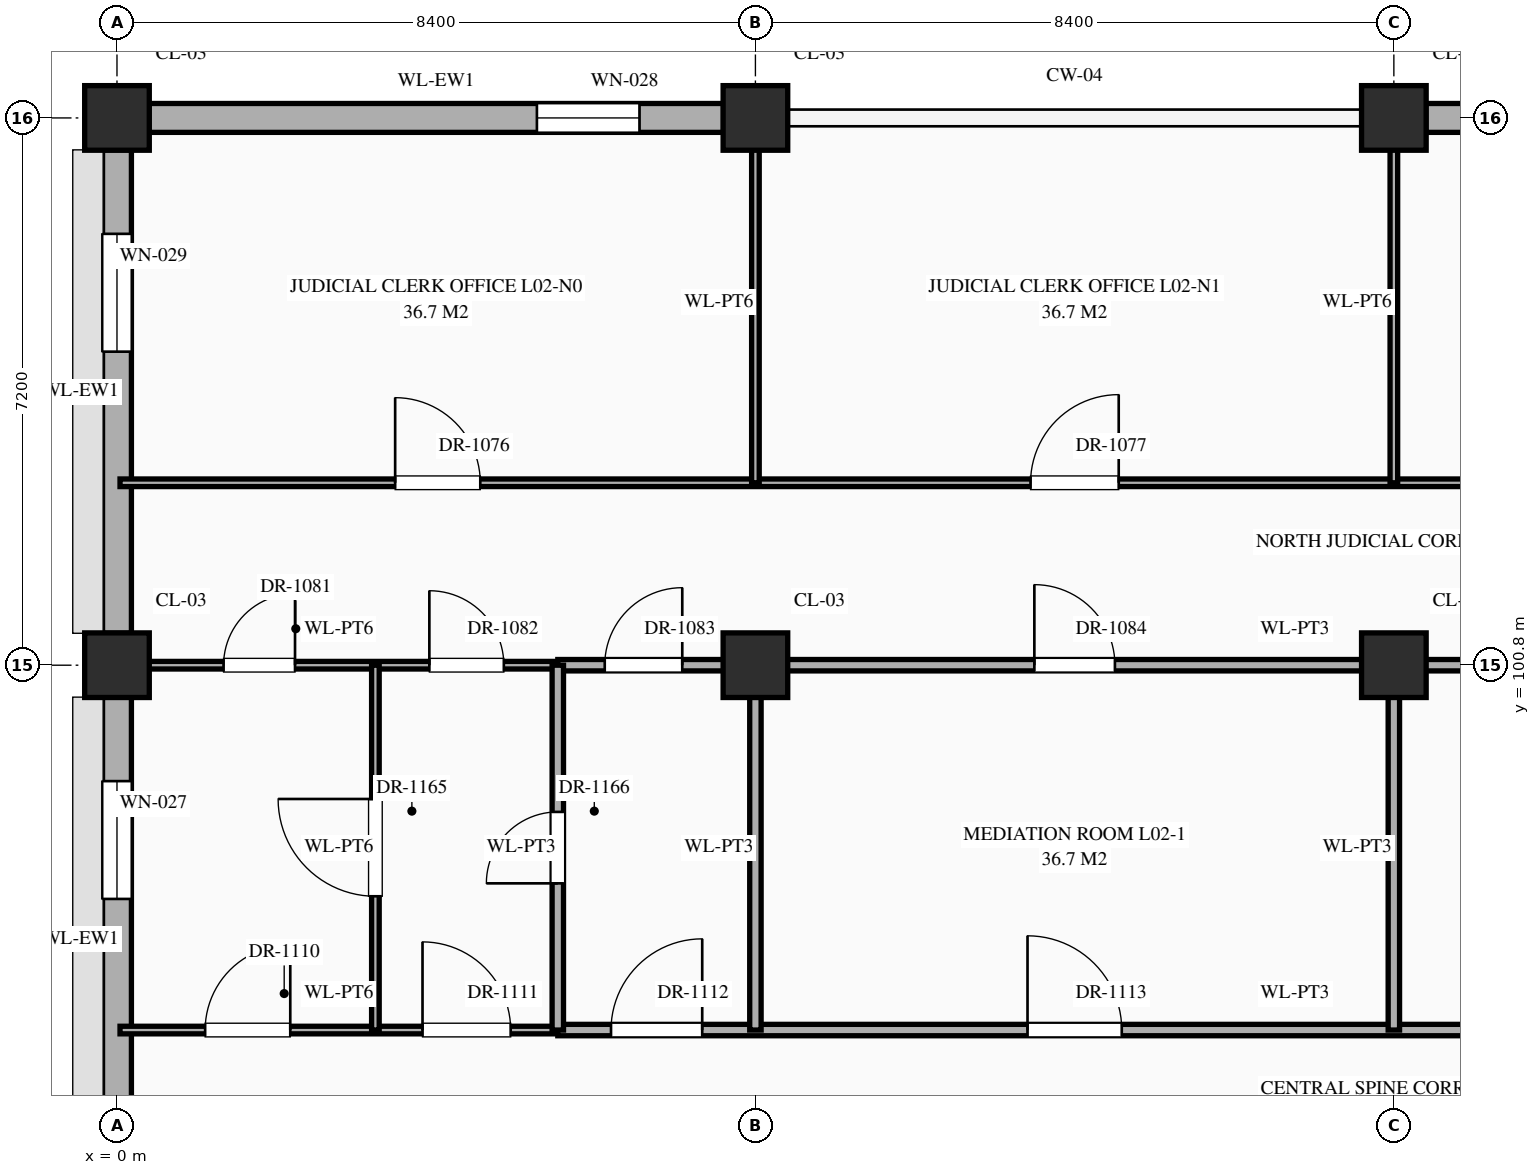
"""IFC4 building model, lengths in metres.
Left out: names, types, materials, properties, quantities, classifications, styles, units other than length and angle.
Written with IfcOpenShell. Run it as: python <this file> out.ifc"""

import sys

from ifc_helpers import new_model, si_unit, direction, frame, frame_2d, origin, origin_2d, place, context, subcontext, project, spatial, rectangle, extrude, element, fill, save


model = new_model("IFC4")
c1 = context("Model", 3, precision=1e-05, world=origin(), true_north=direction((0.0, 1.0)))
c2 = subcontext(c1, "Body", "Model", "MODEL_VIEW")
j1 = project(units=[si_unit("LENGTHUNIT", "METRE"), si_unit("PLANEANGLEUNIT", "RADIAN")], contexts=[c1])
p1 = place(None, origin())
s1 = spatial("IfcSite", under=j1, at=p1, CompositionType="ELEMENT")
p2 = place(p1, origin())
s2 = spatial("IfcBuilding", under=s1, at=p2, CompositionType="ELEMENT")
p3 = place(p2, frame((0.0, 0.0, 5.4)))
s3 = spatial("IfcBuildingStorey", under=s2, at=p3, CompositionType="ELEMENT", Elevation=5.4)
for number, where, z_axis, x_axis in (
    (1, (0.0, 100.8, 0.0), (0.0, 0.0, 1.0), (1.0, 0.0, 0.0)),
    (2, (0.0, 108.0, 0.0), (0.0, 0.0, 1.0), (1.0, 0.0, 0.0)),
    (3, (8.4, 100.8, 0.0), (0.0, 0.0, 1.0), (1.0, 0.0, 0.0)),
    (4, (8.4, 108.0, 0.0), (0.0, 0.0, 1.0), (1.0, 0.0, 0.0)),
    (5, (16.8, 100.8, 0.0), (0.0, 0.0, 1.0), (1.0, 0.0, 0.0)),
    (6, (16.8, 108.0, 0.0), (0.0, 0.0, 1.0), (1.0, 0.0, 0.0)),
):
    element("IfcColumn", number, at=place(p3, frame(where, z_axis=z_axis, x_axis=x_axis)), inside=s3, PredefinedType="COLUMN", context=c2, shape_type="SweptSolid", body=[
        extrude(rectangle(XDim=0.85, YDim=0.85, at=origin_2d()), origin(), (0.0, 0.0, 1.0), 5.4),
    ])
p4 = place(p3, frame((0.0, 94.02, 0.0), z_axis=(0.0, 0.0, 1.0), x_axis=(0.0, 1.0, 0.0)))
e7 = element("IfcWall", 7, at=p4, inside=s3, PredefinedType="STANDARD", context=c2, shape_type="SweptSolid", body=[
    extrude(rectangle(XDim=6.36, YDim=0.38, at=frame_2d((3.18, 0.0))), origin(), (0.0, 0.0, 1.0), 4.47),
])
p5 = place(p4, frame((3.705, 0.0, 0.85)))
e8 = element("IfcOpeningElement", 8, at=p5, cuts=e7, PredefinedType="OPENING", context=c2, shape_type="SweptSolid", body=[
    extrude(rectangle(XDim=1.55, YDim=1.74, at=frame_2d((0.775, 0.87))), frame((0.0, 0.202, 0.0), z_axis=(0.0, -1.0, 0.0), x_axis=(1.0, 0.0, 0.0)), (0.0, 0.0, 1.0), 0.404),
])
p6 = place(p3, frame((0.42, 108.0, 0.0), z_axis=(0.0, 0.0, 1.0), x_axis=(1.0, 0.0, 0.0)))
e9 = element("IfcWall", 9, at=p6, inside=s3, PredefinedType="STANDARD", context=c2, shape_type="SweptSolid", body=[
    extrude(rectangle(XDim=7.56, YDim=0.38, at=frame_2d((3.78, 0.0))), origin(), (0.0, 0.0, 1.0), 4.47),
])
p7 = place(p6, frame((5.105, 0.0, 0.85)))
e10 = element("IfcOpeningElement", 10, at=p7, cuts=e9, PredefinedType="OPENING", context=c2, shape_type="SweptSolid", body=[
    extrude(rectangle(XDim=1.35, YDim=1.92, at=frame_2d((0.675, 0.96))), frame((0.0, 0.202, 0.0), z_axis=(0.0, -1.0, 0.0), x_axis=(1.0, 0.0, 0.0)), (0.0, 0.0, 1.0), 0.404),
])
p8 = place(p3, frame((0.0, 101.22, 0.0), z_axis=(0.0, 0.0, 1.0), x_axis=(0.0, 1.0, 0.0)))
e11 = element("IfcWall", 11, at=p8, inside=s3, PredefinedType="STANDARD", context=c2, shape_type="SweptSolid", body=[
    extrude(rectangle(XDim=6.36, YDim=0.38, at=frame_2d((3.18, 0.0))), origin(), (0.0, 0.0, 1.0), 4.47),
])
p9 = place(p8, frame((3.705, 0.0, 0.85)))
e12 = element("IfcOpeningElement", 12, at=p9, cuts=e11, PredefinedType="OPENING", context=c2, shape_type="SweptSolid", body=[
    extrude(rectangle(XDim=1.55, YDim=1.92, at=frame_2d((0.775, 0.96))), frame((0.0, 0.202, 0.0), z_axis=(0.0, -1.0, 0.0), x_axis=(1.0, 0.0, 0.0)), (0.0, 0.0, 1.0), 0.404),
])
p10 = place(p3, frame((17.22, 108.0, 0.0), z_axis=(0.0, 0.0, 1.0), x_axis=(1.0, 0.0, 0.0)))
e13 = element("IfcWall", 13, at=p10, inside=s3, PredefinedType="STANDARD", context=c2, shape_type="SweptSolid", body=[
    extrude(rectangle(XDim=7.56, YDim=0.38, at=frame_2d((3.78, 0.0))), origin(), (0.0, 0.0, 1.0), 4.47),
])
p11 = place(p10, frame((5.33, 0.0, 0.85)))
e14 = element("IfcOpeningElement", 14, at=p11, cuts=e13, PredefinedType="OPENING", context=c2, shape_type="SweptSolid", body=[
    extrude(rectangle(XDim=0.9, YDim=1.2, at=frame_2d((0.45, 0.6))), frame((0.0, 0.202, 0.0), z_axis=(0.0, -1.0, 0.0), x_axis=(1.0, 0.0, 0.0)), (0.0, 0.0, 1.0), 0.404),
])
p12 = place(p3, frame((0.04, 96.0, 0.0), z_axis=(0.0, 0.0, 1.0), x_axis=(1.0, 0.0, 0.0)))
e15 = element("IfcWall", 15, at=p12, inside=s3, PredefinedType="STANDARD", context=c2, shape_type="SweptSolid", body=[
    extrude(rectangle(XDim=5.76, YDim=0.1, at=frame_2d((2.88, 0.0))), origin(), (0.0, 0.0, 1.0), 5.12),
])
p13 = place(p12, frame((1.12, 0.0, 0.0)))
e16 = element("IfcOpeningElement", 16, at=p13, cuts=e15, PredefinedType="OPENING", context=c2, shape_type="SweptSolid", body=[
    extrude(rectangle(XDim=1.12, YDim=2.25, at=frame_2d((0.56, 1.125))), frame((0.0, 0.062, 0.0), z_axis=(0.0, -1.0, 0.0), x_axis=(1.0, 0.0, 0.0)), (0.0, 0.0, 1.0), 0.124),
])
p14 = place(p12, frame((3.98, 0.0, 0.0)))
e17 = element("IfcOpeningElement", 17, at=p14, cuts=e15, PredefinedType="OPENING", context=c2, shape_type="SweptSolid", body=[
    extrude(rectangle(XDim=1.16, YDim=2.3, at=frame_2d((0.58, 1.15))), frame((0.0, 0.062, 0.0), z_axis=(0.0, -1.0, 0.0), x_axis=(1.0, 0.0, 0.0)), (0.0, 0.0, 1.0), 0.124),
])
p15 = place(p3, frame((5.8, 96.0, 0.0), z_axis=(0.0, 0.0, 1.0), x_axis=(1.0, 0.0, 0.0)))
e18 = element("IfcWall", 18, at=p15, inside=s3, PredefinedType="STANDARD", context=c2, shape_type="SweptSolid", body=[
    extrude(rectangle(XDim=19.4, YDim=0.15, at=frame_2d((9.7, 0.0))), origin(), (0.0, 0.0, 1.0), 5.12),
])
p16 = place(p15, frame((0.7, 0.0, 0.0)))
e19 = element("IfcOpeningElement", 19, at=p16, cuts=e18, PredefinedType="OPENING", context=c2, shape_type="SweptSolid", body=[
    extrude(rectangle(XDim=1.2, YDim=2.35, at=frame_2d((0.6, 1.175))), frame((0.0, 0.087, 0.0), z_axis=(0.0, -1.0, 0.0), x_axis=(1.0, 0.0, 0.0)), (0.0, 0.0, 1.0), 0.174),
])
p17 = place(p15, frame((6.18, 0.0, 0.0)))
e20 = element("IfcOpeningElement", 20, at=p17, cuts=e18, PredefinedType="OPENING", context=c2, shape_type="SweptSolid", body=[
    extrude(rectangle(XDim=1.24, YDim=2.3, at=frame_2d((0.62, 1.15))), frame((0.0, 0.087, 0.0), z_axis=(0.0, -1.0, 0.0), x_axis=(1.0, 0.0, 0.0)), (0.0, 0.0, 1.0), 0.174),
])
p18 = place(p15, frame((14.56, 0.0, 0.0)))
e21 = element("IfcOpeningElement", 21, at=p18, cuts=e18, PredefinedType="OPENING", context=c2, shape_type="SweptSolid", body=[
    extrude(rectangle(XDim=1.28, YDim=2.35, at=frame_2d((0.64, 1.175))), frame((0.0, 0.087, 0.0), z_axis=(0.0, -1.0, 0.0), x_axis=(1.0, 0.0, 0.0)), (0.0, 0.0, 1.0), 0.174),
])
p19 = place(p3, frame((0.04, 100.8, 0.0), z_axis=(0.0, 0.0, 1.0), x_axis=(1.0, 0.0, 0.0)))
e22 = element("IfcWall", 22, at=p19, inside=s3, PredefinedType="STANDARD", context=c2, shape_type="SweptSolid", body=[
    extrude(rectangle(XDim=5.76, YDim=0.1, at=frame_2d((2.88, 0.0))), origin(), (0.0, 0.0, 1.0), 4.27),
])
p20 = place(p19, frame((1.363, 0.0, 0.0)))
e23 = element("IfcOpeningElement", 23, at=p20, cuts=e22, PredefinedType="OPENING", context=c2, shape_type="SweptSolid", body=[
    extrude(rectangle(XDim=0.94, YDim=2.3, at=frame_2d((0.47, 1.15))), frame((0.0, 0.062, 0.0), z_axis=(0.0, -1.0, 0.0), x_axis=(1.0, 0.0, 0.0)), (0.0, 0.0, 1.0), 0.124),
])
p21 = place(p19, frame((4.07, 0.0, 0.0)))
e24 = element("IfcOpeningElement", 24, at=p21, cuts=e22, PredefinedType="OPENING", context=c2, shape_type="SweptSolid", body=[
    extrude(rectangle(XDim=0.98, YDim=2.35, at=frame_2d((0.49, 1.175))), frame((0.0, 0.062, 0.0), z_axis=(0.0, -1.0, 0.0), x_axis=(1.0, 0.0, 0.0)), (0.0, 0.0, 1.0), 0.124),
])
p22 = place(p3, frame((5.8, 100.8, 0.0), z_axis=(0.0, 0.0, 1.0), x_axis=(1.0, 0.0, 0.0)))
e25 = element("IfcWall", 25, at=p22, inside=s3, PredefinedType="STANDARD", context=c2, shape_type="SweptSolid", body=[
    extrude(rectangle(XDim=19.4, YDim=0.15, at=frame_2d((9.7, 0.0))), origin(), (0.0, 0.0, 1.0), 4.27),
])
p23 = place(p22, frame((0.617, 0.0, 0.0)))
e26 = element("IfcOpeningElement", 26, at=p23, cuts=e25, PredefinedType="OPENING", context=c2, shape_type="SweptSolid", body=[
    extrude(rectangle(XDim=1.02, YDim=2.4, at=frame_2d((0.51, 1.2))), frame((0.0, 0.087, 0.0), z_axis=(0.0, -1.0, 0.0), x_axis=(1.0, 0.0, 0.0)), (0.0, 0.0, 1.0), 0.174),
])
p24 = place(p22, frame((6.27, 0.0, 0.0)))
e27 = element("IfcOpeningElement", 27, at=p24, cuts=e25, PredefinedType="OPENING", context=c2, shape_type="SweptSolid", body=[
    extrude(rectangle(XDim=1.06, YDim=2.4, at=frame_2d((0.53, 1.2))), frame((0.0, 0.087, 0.0), z_axis=(0.0, -1.0, 0.0), x_axis=(1.0, 0.0, 0.0)), (0.0, 0.0, 1.0), 0.174),
])
p25 = place(p22, frame((14.63, 0.0, 0.0)))
e28 = element("IfcOpeningElement", 28, at=p25, cuts=e25, PredefinedType="OPENING", context=c2, shape_type="SweptSolid", body=[
    extrude(rectangle(XDim=1.14, YDim=2.4, at=frame_2d((0.57, 1.2))), frame((0.0, 0.087, 0.0), z_axis=(0.0, -1.0, 0.0), x_axis=(1.0, 0.0, 0.0)), (0.0, 0.0, 1.0), 0.174),
])
p26 = place(p3, frame((0.04, 103.2, 0.0), z_axis=(0.0, 0.0, 1.0), x_axis=(1.0, 0.0, 0.0)))
e29 = element("IfcWall", 29, at=p26, inside=s3, PredefinedType="STANDARD", context=c2, shape_type="SweptSolid", body=[
    extrude(rectangle(XDim=41.96, YDim=0.1, at=frame_2d((20.98, 0.0))), origin(), (0.0, 0.0, 1.0), 5.12),
])
p27 = place(p26, frame((3.62, 0.0, 0.0)))
e30 = element("IfcOpeningElement", 30, at=p27, cuts=e29, PredefinedType="OPENING", context=c2, shape_type="SweptSolid", body=[
    extrude(rectangle(XDim=1.12, YDim=2.25, at=frame_2d((0.56, 1.125))), frame((0.0, 0.062, 0.0), z_axis=(0.0, -1.0, 0.0), x_axis=(1.0, 0.0, 0.0)), (0.0, 0.0, 1.0), 0.124),
])
p28 = place(p26, frame((11.98, 0.0, 0.0)))
e31 = element("IfcOpeningElement", 31, at=p28, cuts=e29, PredefinedType="OPENING", context=c2, shape_type="SweptSolid", body=[
    extrude(rectangle(XDim=1.16, YDim=2.3, at=frame_2d((0.58, 1.15))), frame((0.0, 0.062, 0.0), z_axis=(0.0, -1.0, 0.0), x_axis=(1.0, 0.0, 0.0)), (0.0, 0.0, 1.0), 0.124),
])
p29 = place(p26, frame((20.36, 0.0, 0.0)))
e32 = element("IfcOpeningElement", 32, at=p29, cuts=e29, PredefinedType="OPENING", context=c2, shape_type="SweptSolid", body=[
    extrude(rectangle(XDim=1.2, YDim=2.35, at=frame_2d((0.6, 1.175))), frame((0.0, 0.062, 0.0), z_axis=(0.0, -1.0, 0.0), x_axis=(1.0, 0.0, 0.0)), (0.0, 0.0, 1.0), 0.124),
])
p30 = place(p26, frame((28.74, 0.0, 0.0)))
e33 = element("IfcOpeningElement", 33, at=p30, cuts=e29, PredefinedType="OPENING", context=c2, shape_type="SweptSolid", body=[
    extrude(rectangle(XDim=1.24, YDim=2.3, at=frame_2d((0.62, 1.15))), frame((0.0, 0.062, 0.0), z_axis=(0.0, -1.0, 0.0), x_axis=(1.0, 0.0, 0.0)), (0.0, 0.0, 1.0), 0.124),
])
p31 = place(p26, frame((37.12, 0.0, 0.0)))
e34 = element("IfcOpeningElement", 34, at=p31, cuts=e29, PredefinedType="OPENING", context=c2, shape_type="SweptSolid", body=[
    extrude(rectangle(XDim=1.28, YDim=2.35, at=frame_2d((0.64, 1.175))), frame((0.0, 0.062, 0.0), z_axis=(0.0, -1.0, 0.0), x_axis=(1.0, 0.0, 0.0)), (0.0, 0.0, 1.0), 0.124),
])
p32 = place(p3, frame((3.4, 96.0, 0.0), z_axis=(0.0, 0.0, 1.0), x_axis=(0.0, 1.0, 0.0)))
e35 = element("IfcWall", 35, at=p32, inside=s3, PredefinedType="STANDARD", context=c2, shape_type="SweptSolid", body=[
    extrude(rectangle(XDim=4.8, YDim=0.1, at=frame_2d((2.4, 0.0))), origin(), (0.0, 0.0, 1.0), 5.12),
])
p33 = place(p32, frame((1.76, 0.0, 0.0)))
e36 = element("IfcOpeningElement", 36, at=p33, cuts=e35, PredefinedType="OPENING", context=c2, shape_type="SweptSolid", body=[
    extrude(rectangle(XDim=1.28, YDim=2.35, at=frame_2d((0.64, 1.175))), frame((0.0, 0.062, 0.0), z_axis=(0.0, -1.0, 0.0), x_axis=(1.0, 0.0, 0.0)), (0.0, 0.0, 1.0), 0.124),
])
p34 = place(p3, frame((5.8, 96.0, 0.0), z_axis=(0.0, 0.0, 1.0), x_axis=(0.0, 1.0, 0.0)))
e37 = element("IfcWall", 37, at=p34, inside=s3, PredefinedType="STANDARD", context=c2, shape_type="SweptSolid", body=[
    extrude(rectangle(XDim=4.8, YDim=0.15, at=frame_2d((2.4, 0.0))), origin(), (0.0, 0.0, 1.0), 5.12),
])
p35 = place(p34, frame((1.93, 0.0, 0.0)))
e38 = element("IfcOpeningElement", 38, at=p35, cuts=e37, PredefinedType="OPENING", context=c2, shape_type="SweptSolid", body=[
    extrude(rectangle(XDim=0.94, YDim=2.3, at=frame_2d((0.47, 1.15))), frame((0.0, 0.087, 0.0), z_axis=(0.0, -1.0, 0.0), x_axis=(1.0, 0.0, 0.0)), (0.0, 0.0, 1.0), 0.174),
])
p36 = place(p3, frame((8.4, 96.0, 0.0), z_axis=(0.0, 0.0, 1.0), x_axis=(0.0, 1.0, 0.0)))
e39 = element("IfcWall", 39, at=p36, inside=s3, PredefinedType="STANDARD", context=c2, shape_type="SweptSolid", body=[
    extrude(rectangle(XDim=4.8, YDim=0.15, at=frame_2d((2.4, 0.0))), origin(), (0.0, 0.0, 1.0), 4.37),
])
p37 = place(p3, frame((8.4, 103.2, 0.0), z_axis=(0.0, 0.0, 1.0), x_axis=(0.0, 1.0, 0.0)))
e40 = element("IfcWall", 40, at=p37, inside=s3, PredefinedType="STANDARD", context=c2, shape_type="SweptSolid", body=[
    extrude(rectangle(XDim=4.76, YDim=0.1, at=frame_2d((2.38, 0.0))), origin(), (0.0, 0.0, 1.0), 4.37),
])
p38 = place(p3, frame((16.8, 96.0, 0.0), z_axis=(0.0, 0.0, 1.0), x_axis=(0.0, 1.0, 0.0)))
e41 = element("IfcWall", 41, at=p38, inside=s3, PredefinedType="STANDARD", context=c2, shape_type="SweptSolid", body=[
    extrude(rectangle(XDim=4.8, YDim=0.15, at=frame_2d((2.4, 0.0))), origin(), (0.0, 0.0, 1.0), 4.37),
])
p39 = place(p3, frame((16.8, 103.2, 0.0), z_axis=(0.0, 0.0, 1.0), x_axis=(0.0, 1.0, 0.0)))
e42 = element("IfcWall", 42, at=p39, inside=s3, PredefinedType="STANDARD", context=c2, shape_type="SweptSolid", body=[
    extrude(rectangle(XDim=4.76, YDim=0.1, at=frame_2d((2.38, 0.0))), origin(), (0.0, 0.0, 1.0), 4.37),
])
p40 = place(p5, origin())
e43 = element("IfcWindow", 43, at=p40, inside=s3, PartitioningType="SINGLE_PANEL", PredefinedType="WINDOW", context=c2, shape_type="SweptSolid", body=[
    extrude(rectangle(XDim=1.55, YDim=1.74, at=frame_2d((0.775, 0.87))), frame((0.0, 0.03, 0.0), z_axis=(0.0, -1.0, 0.0), x_axis=(1.0, 0.0, 0.0)), (0.0, 0.0, 1.0), 0.06),
])
fill(e8, e43)
p41 = place(p7, origin())
e44 = element("IfcWindow", 44, at=p41, inside=s3, PartitioningType="SINGLE_PANEL", PredefinedType="WINDOW", context=c2, shape_type="SweptSolid", body=[
    extrude(rectangle(XDim=1.35, YDim=1.92, at=frame_2d((0.675, 0.96))), frame((0.0, 0.03, 0.0), z_axis=(0.0, -1.0, 0.0), x_axis=(1.0, 0.0, 0.0)), (0.0, 0.0, 1.0), 0.06),
])
fill(e10, e44)
p42 = place(p9, origin())
e45 = element("IfcWindow", 45, at=p42, inside=s3, PartitioningType="SINGLE_PANEL", PredefinedType="WINDOW", context=c2, shape_type="SweptSolid", body=[
    extrude(rectangle(XDim=1.55, YDim=1.92, at=frame_2d((0.775, 0.96))), frame((0.0, 0.03, 0.0), z_axis=(0.0, -1.0, 0.0), x_axis=(1.0, 0.0, 0.0)), (0.0, 0.0, 1.0), 0.06),
])
fill(e12, e45)
p43 = place(p27, origin())
e46 = element("IfcDoor", 46, at=p43, inside=s3, OperationType="SINGLE_SWING_LEFT", PredefinedType="DOOR", context=c2, shape_type="SweptSolid", body=[
    extrude(rectangle(XDim=1.12, YDim=2.25, at=frame_2d((0.56, 1.125))), frame((0.0, 0.025, 0.0), z_axis=(0.0, -1.0, 0.0), x_axis=(1.0, 0.0, 0.0)), (0.0, 0.0, 1.0), 0.05),
])
fill(e30, e46)
p44 = place(p28, origin())
e47 = element("IfcDoor", 47, at=p44, inside=s3, OperationType="SINGLE_SWING_RIGHT", PredefinedType="DOOR", context=c2, shape_type="SweptSolid", body=[
    extrude(rectangle(XDim=1.16, YDim=2.3, at=frame_2d((0.58, 1.15))), frame((0.0, 0.025, 0.0), z_axis=(0.0, -1.0, 0.0), x_axis=(1.0, 0.0, 0.0)), (0.0, 0.0, 1.0), 0.05),
])
fill(e31, e47)
p45 = place(p20, origin())
e48 = element("IfcDoor", 48, at=p45, inside=s3, OperationType="SINGLE_SWING_RIGHT", PredefinedType="DOOR", context=c2, shape_type="SweptSolid", body=[
    extrude(rectangle(XDim=0.94, YDim=2.3, at=frame_2d((0.47, 1.15))), frame((0.0, 0.025, 0.0), z_axis=(0.0, -1.0, 0.0), x_axis=(1.0, 0.0, 0.0)), (0.0, 0.0, 1.0), 0.05),
])
fill(e23, e48)
p46 = place(p21, origin())
e49 = element("IfcDoor", 49, at=p46, inside=s3, OperationType="SINGLE_SWING_LEFT", PredefinedType="DOOR", context=c2, shape_type="SweptSolid", body=[
    extrude(rectangle(XDim=0.98, YDim=2.35, at=frame_2d((0.49, 1.175))), frame((0.0, 0.025, 0.0), z_axis=(0.0, -1.0, 0.0), x_axis=(1.0, 0.0, 0.0)), (0.0, 0.0, 1.0), 0.05),
])
fill(e24, e49)
p47 = place(p23, origin())
e50 = element("IfcDoor", 50, at=p47, inside=s3, OperationType="SINGLE_SWING_RIGHT", PredefinedType="DOOR", context=c2, shape_type="SweptSolid", body=[
    extrude(rectangle(XDim=1.02, YDim=2.4, at=frame_2d((0.51, 1.2))), frame((0.0, 0.025, 0.0), z_axis=(0.0, -1.0, 0.0), x_axis=(1.0, 0.0, 0.0)), (0.0, 0.0, 1.0), 0.05),
])
fill(e26, e50)
p48 = place(p24, origin())
e51 = element("IfcDoor", 51, at=p48, inside=s3, OperationType="SINGLE_SWING_LEFT", PredefinedType="DOOR", context=c2, shape_type="SweptSolid", body=[
    extrude(rectangle(XDim=1.06, YDim=2.4, at=frame_2d((0.53, 1.2))), frame((0.0, 0.025, 0.0), z_axis=(0.0, -1.0, 0.0), x_axis=(1.0, 0.0, 0.0)), (0.0, 0.0, 1.0), 0.05),
])
fill(e27, e51)
p49 = place(p13, origin())
e52 = element("IfcDoor", 52, at=p49, inside=s3, OperationType="SINGLE_SWING_RIGHT", PredefinedType="DOOR", context=c2, shape_type="SweptSolid", body=[
    extrude(rectangle(XDim=1.12, YDim=2.25, at=frame_2d((0.56, 1.125))), frame((0.0, 0.025, 0.0), z_axis=(0.0, -1.0, 0.0), x_axis=(1.0, 0.0, 0.0)), (0.0, 0.0, 1.0), 0.05),
])
fill(e16, e52)
p50 = place(p14, origin())
e53 = element("IfcDoor", 53, at=p50, inside=s3, OperationType="SINGLE_SWING_LEFT", PredefinedType="DOOR", context=c2, shape_type="SweptSolid", body=[
    extrude(rectangle(XDim=1.16, YDim=2.3, at=frame_2d((0.58, 1.15))), frame((0.0, 0.025, 0.0), z_axis=(0.0, -1.0, 0.0), x_axis=(1.0, 0.0, 0.0)), (0.0, 0.0, 1.0), 0.05),
])
fill(e17, e53)
p51 = place(p16, origin())
e54 = element("IfcDoor", 54, at=p51, inside=s3, OperationType="SINGLE_SWING_RIGHT", PredefinedType="DOOR", context=c2, shape_type="SweptSolid", body=[
    extrude(rectangle(XDim=1.2, YDim=2.35, at=frame_2d((0.6, 1.175))), frame((0.0, 0.025, 0.0), z_axis=(0.0, -1.0, 0.0), x_axis=(1.0, 0.0, 0.0)), (0.0, 0.0, 1.0), 0.05),
])
fill(e19, e54)
p52 = place(p17, origin())
e55 = element("IfcDoor", 55, at=p52, inside=s3, OperationType="SINGLE_SWING_LEFT", PredefinedType="DOOR", context=c2, shape_type="SweptSolid", body=[
    extrude(rectangle(XDim=1.24, YDim=2.3, at=frame_2d((0.62, 1.15))), frame((0.0, 0.025, 0.0), z_axis=(0.0, -1.0, 0.0), x_axis=(1.0, 0.0, 0.0)), (0.0, 0.0, 1.0), 0.05),
])
fill(e20, e55)
p53 = place(p33, origin())
e56 = element("IfcDoor", 56, at=p53, inside=s3, OperationType="SINGLE_SWING_RIGHT", PredefinedType="DOOR", context=c2, shape_type="SweptSolid", body=[
    extrude(rectangle(XDim=1.28, YDim=2.35, at=frame_2d((0.64, 1.175))), frame((0.0, 0.025, 0.0), z_axis=(0.0, -1.0, 0.0), x_axis=(1.0, 0.0, 0.0)), (0.0, 0.0, 1.0), 0.05),
])
fill(e36, e56)
p54 = place(p35, origin())
e57 = element("IfcDoor", 57, at=p54, inside=s3, OperationType="SINGLE_SWING_LEFT", PredefinedType="DOOR", context=c2, shape_type="SweptSolid", body=[
    extrude(rectangle(XDim=0.94, YDim=2.3, at=frame_2d((0.47, 1.15))), frame((0.0, 0.025, 0.0), z_axis=(0.0, -1.0, 0.0), x_axis=(1.0, 0.0, 0.0)), (0.0, 0.0, 1.0), 0.05),
])
fill(e38, e57)
save(model, sys.argv[1])
